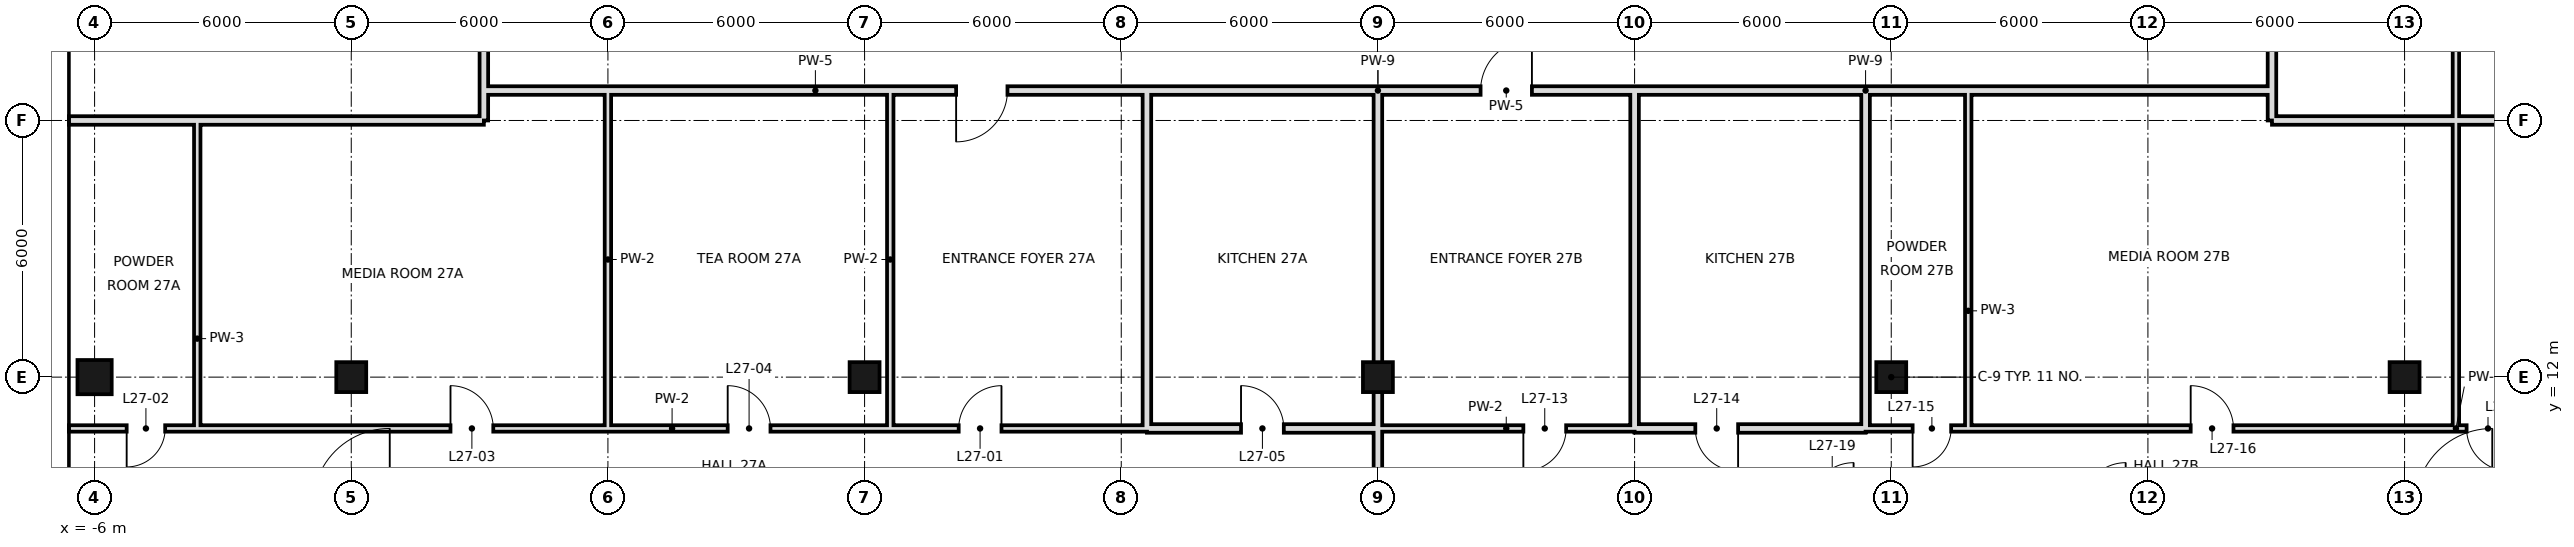
"""IFC4 building model, lengths in metres.
Left out: names, types, materials, properties, quantities, classifications, styles, units other than length and angle.
Written with IfcOpenShell. Run it as: python <this file> out.ifc"""

import sys

from ifc_helpers import new_model, si_unit, direction, frame, frame_2d, origin, origin_2d, place, context, subcontext, project, spatial, rectangle, hollow_rectangle, extrude, element, fill, save


model = new_model("IFC4")
c1 = context("Model", 3, precision=1e-05, world=origin(), true_north=direction((0.0, 1.0)))
c2 = subcontext(c1, "Body", "Model", "MODEL_VIEW")
j1 = project(units=[si_unit("LENGTHUNIT", "METRE"), si_unit("PLANEANGLEUNIT", "RADIAN")], contexts=[c1])
p1 = place(None, origin())
s1 = spatial("IfcSite", under=j1, at=p1, CompositionType="ELEMENT")
p2 = place(p1, origin())
s2 = spatial("IfcBuilding", under=s1, at=p2, CompositionType="ELEMENT")
p3 = place(p2, frame((0.0, 0.0, 123.2)))
s3 = spatial("IfcBuildingStorey", under=s2, at=p3, CompositionType="ELEMENT", Elevation=123.2)
p4 = place(p3, frame((-6.0, 12.0, 0.0), z_axis=(0.0, 0.0, 1.0), x_axis=(1.0, 0.0, 0.0)))
e1 = element("IfcColumn", 1, at=p4, inside=s3, PredefinedType="COLUMN", context=c2, shape_type="SweptSolid", body=[
    extrude(hollow_rectangle(XDim=0.8, YDim=0.8, WallThickness=0.04, at=origin_2d()), origin(), (0.0, 0.0, 1.0), 3.6),
])
for number, where, z_axis, x_axis in (
    (2, (0.0, 12.0, 0.0), (0.0, 0.0, 1.0), (1.0, 0.0, 0.0)),
    (3, (12.0, 12.0, 0.0), (0.0, 0.0, 1.0), (1.0, 0.0, 0.0)),
    (4, (24.0, 12.0, 0.0), (0.0, 0.0, 1.0), (1.0, 0.0, 0.0)),
    (5, (36.0, 12.0, 0.0), (0.0, 0.0, 1.0), (1.0, 0.0, 0.0)),
    (6, (48.0, 12.0, 0.0), (0.0, 0.0, 1.0), (1.0, 0.0, 0.0)),
):
    element("IfcColumn", number, at=place(p3, frame(where, z_axis=z_axis, x_axis=x_axis)), inside=s3, PredefinedType="COLUMN", context=c2, shape_type="SweptSolid", body=[
        extrude(hollow_rectangle(XDim=0.7, YDim=0.7, WallThickness=0.036, at=origin_2d()), origin(), (0.0, 0.0, 1.0), 3.6),
    ])
p5 = place(p3, frame((-3.6, 10.8, 0.0), z_axis=(0.0, 0.0, 1.0), x_axis=(0.0, 1.0, 0.0)))
e7 = element("IfcWall", 7, at=p5, inside=s3, PredefinedType="PARTITIONING", context=c2, shape_type="SweptSolid", body=[
    extrude(rectangle(XDim=7.2, YDim=0.15, at=frame_2d((3.6, 0.0))), origin(), (0.0, 0.0, 1.0), 3.42),
])
p6 = place(p3, frame((12.6, 10.8, 0.0), z_axis=(0.0, 0.0, 1.0), x_axis=(0.0, 1.0, 0.0)))
e8 = element("IfcWall", 8, at=p6, inside=s3, PredefinedType="PARTITIONING", context=c2, shape_type="SweptSolid", body=[
    extrude(rectangle(XDim=7.9, YDim=0.15, at=frame_2d((3.95, 0.0))), origin(), (0.0, 0.0, 1.0), 3.42),
])
for number, where, z_axis, x_axis in (
    (9, (18.6, 10.8, 0.0), (0.0, 0.0, 1.0), (0.0, 1.0, 0.0)),
    (10, (24.0, 10.8, 0.0), (0.0, 0.0, 1.0), (0.0, 1.0, 0.0)),
):
    element("IfcWall", number, at=place(p3, frame(where, z_axis=z_axis, x_axis=x_axis)), inside=s3, PredefinedType="SOLIDWALL", context=c2, shape_type="SweptSolid", body=[
        extrude(rectangle(XDim=7.9, YDim=0.2, at=frame_2d((3.95, 0.0))), origin(), (0.0, 0.0, 1.0), 2.72),
    ])
p7 = place(p3, frame((24.0, 0.0, 0.0), z_axis=(0.0, 0.0, 1.0), x_axis=(0.0, 1.0, 0.0)))
e11 = element("IfcWall", 11, at=p7, inside=s3, PredefinedType="SOLIDWALL", context=c2, shape_type="SweptSolid", body=[
    extrude(rectangle(XDim=10.8, YDim=0.2, at=frame_2d((5.4, 0.0))), origin(), (0.0, 0.0, 1.0), 2.72),
])
p8 = place(p3, frame((3.1, 18.0, 0.0), z_axis=(0.0, 0.0, 1.0), x_axis=(0.0, 1.0, 0.0)))
e12 = element("IfcWall", 12, at=p8, inside=s3, PredefinedType="SOLIDWALL", context=c2, shape_type="SweptSolid", body=[
    extrude(rectangle(XDim=30.6, YDim=0.2, at=frame_2d((15.3, 0.0))), origin(), (0.0, 0.0, 1.0), 2.72),
])
p9 = place(p8, frame((14.75, 0.0, 0.0)))
e13 = element("IfcOpeningElement", 13, at=p9, cuts=e12, PredefinedType="OPENING", context=c2, shape_type="SweptSolid", body=[
    extrude(rectangle(XDim=1.2, YDim=2.4, at=frame_2d((0.6, 1.2))), frame((0.0, 0.11, 0.0), z_axis=(0.0, -1.0, 0.0), x_axis=(1.0, 0.0, 0.0)), (0.0, 0.0, 1.0), 0.22),
])
for number, where, z_axis, x_axis in (
    (14, (30.0, 10.8, 0.0), (0.0, 0.0, 1.0), (0.0, 1.0, 0.0)),
    (15, (35.4, 10.8, 0.0), (0.0, 0.0, 1.0), (0.0, 1.0, 0.0)),
):
    element("IfcWall", number, at=place(p3, frame(where, z_axis=z_axis, x_axis=x_axis)), inside=s3, PredefinedType="SOLIDWALL", context=c2, shape_type="SweptSolid", body=[
        extrude(rectangle(XDim=7.9, YDim=0.2, at=frame_2d((3.95, 0.0))), origin(), (0.0, 0.0, 1.0), 2.72),
    ])
p10 = place(p3, frame((37.8, 10.8, 0.0), z_axis=(0.0, 0.0, 1.0), x_axis=(0.0, 1.0, 0.0)))
e16 = element("IfcWall", 16, at=p10, inside=s3, PredefinedType="PARTITIONING", context=c2, shape_type="SweptSolid", body=[
    extrude(rectangle(XDim=7.9, YDim=0.15, at=frame_2d((3.95, 0.0))), origin(), (0.0, 0.0, 1.0), 3.42),
])
p11 = place(p3, frame((44.9, 18.7, 0.0), z_axis=(0.0, 0.0, 1.0), x_axis=(0.0, 1.0, 0.0)))
e17 = element("IfcWall", 17, at=p11, inside=s3, PredefinedType="SOLIDWALL", context=c2, shape_type="SweptSolid", body=[
    extrude(rectangle(XDim=14.9, YDim=0.2, at=frame_2d((7.45, 0.0))), origin(), (0.0, 0.0, 1.0), 2.97),
])
p12 = place(p11, frame((9.72, 0.0, 0.0)))
e18 = element("IfcOpeningElement", 18, at=p12, cuts=e17, PredefinedType="OPENING", context=c2, shape_type="SweptSolid", body=[
    extrude(rectangle(XDim=1.2, YDim=2.4, at=frame_2d((0.6, 1.2))), frame((0.0, 0.11, 0.0), z_axis=(0.0, -1.0, 0.0), x_axis=(1.0, 0.0, 0.0)), (0.0, 0.0, 1.0), 0.22),
])
p13 = place(p3, frame((44.9, 18.0, 0.0), z_axis=(0.0, 0.0, 1.0), x_axis=(0.0, 1.0, 0.0)))
e19 = element("IfcWall", 19, at=p13, inside=s3, PredefinedType="SOLIDWALL", context=c2, shape_type="SweptSolid", body=[
    extrude(rectangle(XDim=0.7, YDim=0.2, at=frame_2d((0.35, 0.0))), origin(), (0.0, 0.0, 1.0), 2.97),
])
p14 = place(p3, frame((49.2, 10.8, 0.0), z_axis=(0.0, 0.0, 1.0), x_axis=(0.0, 1.0, 0.0)))
e20 = element("IfcWall", 20, at=p14, inside=s3, PredefinedType="PARTITIONING", context=c2, shape_type="SweptSolid", body=[
    extrude(rectangle(XDim=20.4, YDim=0.15, at=frame_2d((10.2, 0.0))), origin(), (0.0, 0.0, 1.0), 3.42),
])
p15 = place(p14, frame((17.68, 0.0, 0.0)))
e21 = element("IfcOpeningElement", 21, at=p15, cuts=e20, PredefinedType="OPENING", context=c2, shape_type="SweptSolid", body=[
    extrude(rectangle(XDim=1.0, YDim=2.4, at=frame_2d((0.5, 1.2))), frame((0.0, 0.085, 0.0), z_axis=(0.0, -1.0, 0.0), x_axis=(1.0, 0.0, 0.0)), (0.0, 0.0, 1.0), 0.17),
])
p16 = place(p14, frame((9.88, 0.0, 0.0)))
e22 = element("IfcOpeningElement", 22, at=p16, cuts=e20, PredefinedType="OPENING", context=c2, shape_type="SweptSolid", body=[
    extrude(rectangle(XDim=1.0, YDim=2.4, at=frame_2d((0.5, 1.2))), frame((0.0, 0.085, 0.0), z_axis=(0.0, -1.0, 0.0), x_axis=(1.0, 0.0, 0.0)), (0.0, 0.0, 1.0), 0.17),
])
p17 = place(p3, frame((6.0, 10.8, 0.0), z_axis=(0.0, 0.0, 1.0), x_axis=(0.0, 1.0, 0.0)))
e23 = element("IfcWall", 23, at=p17, inside=s3, PredefinedType="PARTITIONING", context=c2, shape_type="SweptSolid", body=[
    extrude(rectangle(XDim=7.9, YDim=0.15, at=frame_2d((3.95, 0.0))), origin(), (0.0, 0.0, 1.0), 2.72),
])
p18 = place(p3, frame((18.6, 10.8, 0.0), z_axis=(0.0, 0.0, 1.0), x_axis=(1.0, 0.0, 0.0)))
e24 = element("IfcWall", 24, at=p18, inside=s3, PredefinedType="SOLIDWALL", context=c2, shape_type="SweptSolid", body=[
    extrude(rectangle(XDim=5.4, YDim=0.2, at=frame_2d((2.7, 0.0))), origin(), (0.0, 0.0, 1.0), 2.72),
])
p19 = place(p18, frame((2.2, 0.0, 0.0)))
e25 = element("IfcOpeningElement", 25, at=p19, cuts=e24, PredefinedType="OPENING", context=c2, shape_type="SweptSolid", body=[
    extrude(rectangle(XDim=1.0, YDim=2.4, at=frame_2d((0.5, 1.2))), frame((0.0, 0.11, 0.0), z_axis=(0.0, -1.0, 0.0), x_axis=(1.0, 0.0, 0.0)), (0.0, 0.0, 1.0), 0.22),
])
p20 = place(p3, frame((30.0, 10.8, 0.0), z_axis=(0.0, 0.0, 1.0), x_axis=(1.0, 0.0, 0.0)))
e26 = element("IfcWall", 26, at=p20, inside=s3, PredefinedType="SOLIDWALL", context=c2, shape_type="SweptSolid", body=[
    extrude(rectangle(XDim=5.4, YDim=0.2, at=frame_2d((2.7, 0.0))), origin(), (0.0, 0.0, 1.0), 2.72),
])
p21 = place(p20, frame((1.42, 0.0, 0.0)))
e27 = element("IfcOpeningElement", 27, at=p21, cuts=e26, PredefinedType="OPENING", context=c2, shape_type="SweptSolid", body=[
    extrude(rectangle(XDim=1.0, YDim=2.4, at=frame_2d((0.5, 1.2))), frame((0.0, 0.11, 0.0), z_axis=(0.0, -1.0, 0.0), x_axis=(1.0, 0.0, 0.0)), (0.0, 0.0, 1.0), 0.22),
])
p22 = place(p3, frame((-3.6, 10.8, 0.0), z_axis=(0.0, 0.0, 1.0), x_axis=(1.0, 0.0, 0.0)))
e28 = element("IfcWall", 28, at=p22, inside=s3, PredefinedType="PARTITIONING", context=c2, shape_type="SweptSolid", body=[
    extrude(rectangle(XDim=22.2, YDim=0.15, at=frame_2d((11.1, 0.0))), origin(), (0.0, 0.0, 1.0), 3.42),
])
p23 = place(p22, frame((17.8, 0.0, 0.0)))
e29 = element("IfcOpeningElement", 29, at=p23, cuts=e28, PredefinedType="OPENING", context=c2, shape_type="SweptSolid", body=[
    extrude(rectangle(XDim=1.0, YDim=2.4, at=frame_2d((0.5, 1.2))), frame((0.0, 0.085, 0.0), z_axis=(0.0, -1.0, 0.0), x_axis=(1.0, 0.0, 0.0)), (0.0, 0.0, 1.0), 0.17),
])
p24 = place(p22, frame((5.92, 0.0, 0.0)))
e30 = element("IfcOpeningElement", 30, at=p24, cuts=e28, PredefinedType="OPENING", context=c2, shape_type="SweptSolid", body=[
    extrude(rectangle(XDim=1.0, YDim=2.4, at=frame_2d((0.5, 1.2))), frame((0.0, 0.085, 0.0), z_axis=(0.0, -1.0, 0.0), x_axis=(1.0, 0.0, 0.0)), (0.0, 0.0, 1.0), 0.17),
])
p25 = place(p22, frame((12.4, 0.0, 0.0)))
e31 = element("IfcOpeningElement", 31, at=p25, cuts=e28, PredefinedType="OPENING", context=c2, shape_type="SweptSolid", body=[
    extrude(rectangle(XDim=1.0, YDim=2.4, at=frame_2d((0.5, 1.2))), frame((0.0, 0.085, 0.0), z_axis=(0.0, -1.0, 0.0), x_axis=(1.0, 0.0, 0.0)), (0.0, 0.0, 1.0), 0.17),
])
p26 = place(p3, frame((24.0, 10.8, 0.0), z_axis=(0.0, 0.0, 1.0), x_axis=(1.0, 0.0, 0.0)))
e32 = element("IfcWall", 32, at=p26, inside=s3, PredefinedType="PARTITIONING", context=c2, shape_type="SweptSolid", body=[
    extrude(rectangle(XDim=6.0, YDim=0.15, at=frame_2d((3.0, 0.0))), origin(), (0.0, 0.0, 1.0), 3.42),
])
p27 = place(p26, frame((3.4, 0.0, 0.0)))
e33 = element("IfcOpeningElement", 33, at=p27, cuts=e32, PredefinedType="OPENING", context=c2, shape_type="SweptSolid", body=[
    extrude(rectangle(XDim=1.0, YDim=2.4, at=frame_2d((0.5, 1.2))), frame((0.0, 0.085, 0.0), z_axis=(0.0, -1.0, 0.0), x_axis=(1.0, 0.0, 0.0)), (0.0, 0.0, 1.0), 0.17),
])
p28 = place(p3, frame((37.8, 10.8, 0.0), z_axis=(0.0, 0.0, 1.0), x_axis=(1.0, 0.0, 0.0)))
e34 = element("IfcWall", 34, at=p28, inside=s3, PredefinedType="PARTITIONING", context=c2, shape_type="SweptSolid", body=[
    extrude(rectangle(XDim=22.8, YDim=0.15, at=frame_2d((11.4, 0.0))), origin(), (0.0, 0.0, 1.0), 3.42),
])
p29 = place(p28, frame((5.2, 0.0, 0.0)))
e35 = element("IfcOpeningElement", 35, at=p29, cuts=e34, PredefinedType="OPENING", context=c2, shape_type="SweptSolid", body=[
    extrude(rectangle(XDim=1.0, YDim=2.4, at=frame_2d((0.5, 1.2))), frame((0.0, 0.085, 0.0), z_axis=(0.0, -1.0, 0.0), x_axis=(1.0, 0.0, 0.0)), (0.0, 0.0, 1.0), 0.17),
])
p30 = place(p28, frame((11.65, 0.0, 0.0)))
e36 = element("IfcOpeningElement", 36, at=p30, cuts=e34, PredefinedType="OPENING", context=c2, shape_type="SweptSolid", body=[
    extrude(rectangle(XDim=1.0, YDim=2.4, at=frame_2d((0.5, 1.2))), frame((0.0, 0.085, 0.0), z_axis=(0.0, -1.0, 0.0), x_axis=(1.0, 0.0, 0.0)), (0.0, 0.0, 1.0), 0.17),
])
p31 = place(p3, frame((-6.6, 10.8, 0.0), z_axis=(0.0, 0.0, 1.0), x_axis=(1.0, 0.0, 0.0)))
e37 = element("IfcWall", 37, at=p31, inside=s3, PredefinedType="PARTITIONING", context=c2, shape_type="SweptSolid", body=[
    extrude(rectangle(XDim=3.0, YDim=0.15, at=frame_2d((1.5, 0.0))), origin(), (0.0, 0.0, 1.0), 3.42),
])
p32 = place(p31, frame((1.35, 0.0, 0.0)))
e38 = element("IfcOpeningElement", 38, at=p32, cuts=e37, PredefinedType="OPENING", context=c2, shape_type="SweptSolid", body=[
    extrude(rectangle(XDim=0.9, YDim=2.4, at=frame_2d((0.45, 1.2))), frame((0.0, 0.085, 0.0), z_axis=(0.0, -1.0, 0.0), x_axis=(1.0, 0.0, 0.0)), (0.0, 0.0, 1.0), 0.17),
])
p33 = place(p3, frame((35.4, 10.8, 0.0), z_axis=(0.0, 0.0, 1.0), x_axis=(1.0, 0.0, 0.0)))
e39 = element("IfcWall", 39, at=p33, inside=s3, PredefinedType="PARTITIONING", context=c2, shape_type="SweptSolid", body=[
    extrude(rectangle(XDim=2.4, YDim=0.15, at=frame_2d((1.2, 0.0))), origin(), (0.0, 0.0, 1.0), 3.42),
])
p34 = place(p33, frame((1.1, 0.0, 0.0)))
e40 = element("IfcOpeningElement", 40, at=p34, cuts=e39, PredefinedType="OPENING", context=c2, shape_type="SweptSolid", body=[
    extrude(rectangle(XDim=0.9, YDim=2.4, at=frame_2d((0.45, 1.2))), frame((0.0, 0.085, 0.0), z_axis=(0.0, -1.0, 0.0), x_axis=(1.0, 0.0, 0.0)), (0.0, 0.0, 1.0), 0.17),
])
p35 = place(p3, frame((-6.6, 18.0, 0.0), z_axis=(0.0, 0.0, 1.0), x_axis=(1.0, 0.0, 0.0)))
e41 = element("IfcWall", 41, at=p35, inside=s3, PredefinedType="SOLIDWALL", context=c2, shape_type="SweptSolid", body=[
    extrude(rectangle(XDim=9.7, YDim=0.2, at=frame_2d((4.85, 0.0))), origin(), (0.0, 0.0, 1.0), 2.72),
])
p36 = place(p3, frame((44.9, 18.0, 0.0), z_axis=(0.0, 0.0, 1.0), x_axis=(1.0, 0.0, 0.0)))
e42 = element("IfcWall", 42, at=p36, inside=s3, PredefinedType="SOLIDWALL", context=c2, shape_type="SweptSolid", body=[
    extrude(rectangle(XDim=15.7, YDim=0.2, at=frame_2d((7.85, 0.0))), origin(), (0.0, 0.0, 1.0), 2.72),
])
p37 = place(p3, frame((3.1, 18.7, 0.0), z_axis=(0.0, 0.0, 1.0), x_axis=(1.0, 0.0, 0.0)))
e43 = element("IfcWall", 43, at=p37, inside=s3, PredefinedType="SOLIDWALL", context=c2, shape_type="SweptSolid", body=[
    extrude(rectangle(XDim=15.5, YDim=0.2, at=frame_2d((7.75, 0.0))), origin(), (0.0, 0.0, 1.0), 2.72),
])
p38 = place(p37, frame((11.04, 0.0, 0.0)))
e44 = element("IfcOpeningElement", 44, at=p38, cuts=e43, PredefinedType="OPENING", context=c2, shape_type="SweptSolid", body=[
    extrude(rectangle(XDim=1.2, YDim=2.4, at=frame_2d((0.6, 1.2))), frame((0.0, 0.11, 0.0), z_axis=(0.0, -1.0, 0.0), x_axis=(1.0, 0.0, 0.0)), (0.0, 0.0, 1.0), 0.22),
])
p39 = place(p3, frame((24.0, 18.7, 0.0), z_axis=(0.0, 0.0, 1.0), x_axis=(1.0, 0.0, 0.0)))
e45 = element("IfcWall", 45, at=p39, inside=s3, PredefinedType="SOLIDWALL", context=c2, shape_type="SweptSolid", body=[
    extrude(rectangle(XDim=6.0, YDim=0.2, at=frame_2d((3.0, 0.0))), origin(), (0.0, 0.0, 1.0), 2.72),
])
p40 = place(p39, frame((2.4, 0.0, 0.0)))
e46 = element("IfcOpeningElement", 46, at=p40, cuts=e45, PredefinedType="OPENING", context=c2, shape_type="SweptSolid", body=[
    extrude(rectangle(XDim=1.2, YDim=2.4, at=frame_2d((0.6, 1.2))), frame((0.0, 0.11, 0.0), z_axis=(0.0, -1.0, 0.0), x_axis=(1.0, 0.0, 0.0)), (0.0, 0.0, 1.0), 0.22),
])
p41 = place(p3, frame((35.4, 18.7, 0.0), z_axis=(0.0, 0.0, 1.0), x_axis=(1.0, 0.0, 0.0)))
e47 = element("IfcWall", 47, at=p41, inside=s3, PredefinedType="SOLIDWALL", context=c2, shape_type="SweptSolid", body=[
    extrude(rectangle(XDim=9.5, YDim=0.2, at=frame_2d((4.75, 0.0))), origin(), (0.0, 0.0, 1.0), 2.72),
])
p42 = place(p3, frame((18.6, 18.7, 0.0), z_axis=(0.0, 0.0, 1.0), x_axis=(1.0, 0.0, 0.0)))
e48 = element("IfcWall", 48, at=p42, inside=s3, PredefinedType="SOLIDWALL", context=c2, shape_type="SweptSolid", body=[
    extrude(rectangle(XDim=5.4, YDim=0.2, at=frame_2d((2.7, 0.0))), origin(), (0.0, 0.0, 1.0), 3.42),
])
p43 = place(p3, frame((30.0, 18.7, 0.0), z_axis=(0.0, 0.0, 1.0), x_axis=(1.0, 0.0, 0.0)))
e49 = element("IfcWall", 49, at=p43, inside=s3, PredefinedType="SOLIDWALL", context=c2, shape_type="SweptSolid", body=[
    extrude(rectangle(XDim=5.4, YDim=0.2, at=frame_2d((2.7, 0.0))), origin(), (0.0, 0.0, 1.0), 2.72),
])
p44 = place(p23, frame((1.0, 0.0, 0.0), z_axis=(0.0, 0.0, 1.0), x_axis=(-1.0, 0.0, 0.0)))
e50 = element("IfcDoor", 50, at=p44, inside=s3, OperationType="SINGLE_SWING_LEFT", PredefinedType="DOOR", context=c2, shape_type="SweptSolid", body=[
    extrude(rectangle(XDim=1.0, YDim=2.4, at=frame_2d((0.5, 1.2))), frame((0.0, 0.025, 0.0), z_axis=(0.0, -1.0, 0.0), x_axis=(1.0, 0.0, 0.0)), (0.0, 0.0, 1.0), 0.05),
])
fill(e29, e50)
p45 = place(p32, frame((0.9, 0.0, 0.0), z_axis=(0.0, 0.0, 1.0), x_axis=(-1.0, 0.0, 0.0)))
e51 = element("IfcDoor", 51, at=p45, inside=s3, OperationType="SINGLE_SWING_RIGHT", PredefinedType="DOOR", context=c2, shape_type="SweptSolid", body=[
    extrude(rectangle(XDim=0.9, YDim=2.4, at=frame_2d((0.45, 1.2))), frame((0.0, 0.025, 0.0), z_axis=(0.0, -1.0, 0.0), x_axis=(1.0, 0.0, 0.0)), (0.0, 0.0, 1.0), 0.05),
])
fill(e38, e51)
p46 = place(p24, origin())
e52 = element("IfcDoor", 52, at=p46, inside=s3, OperationType="SINGLE_SWING_LEFT", PredefinedType="DOOR", context=c2, shape_type="SweptSolid", body=[
    extrude(rectangle(XDim=1.0, YDim=2.4, at=frame_2d((0.5, 1.2))), frame((0.0, 0.025, 0.0), z_axis=(0.0, -1.0, 0.0), x_axis=(1.0, 0.0, 0.0)), (0.0, 0.0, 1.0), 0.05),
])
fill(e30, e52)
p47 = place(p25, origin())
e53 = element("IfcDoor", 53, at=p47, inside=s3, OperationType="SINGLE_SWING_LEFT", PredefinedType="DOOR", context=c2, shape_type="SweptSolid", body=[
    extrude(rectangle(XDim=1.0, YDim=2.4, at=frame_2d((0.5, 1.2))), frame((0.0, 0.025, 0.0), z_axis=(0.0, -1.0, 0.0), x_axis=(1.0, 0.0, 0.0)), (0.0, 0.0, 1.0), 0.05),
])
fill(e31, e53)
p48 = place(p19, origin())
e54 = element("IfcDoor", 54, at=p48, inside=s3, OperationType="SINGLE_SWING_LEFT", PredefinedType="DOOR", context=c2, shape_type="SweptSolid", body=[
    extrude(rectangle(XDim=1.0, YDim=2.4, at=frame_2d((0.5, 1.2))), frame((0.0, 0.025, 0.0), z_axis=(0.0, -1.0, 0.0), x_axis=(1.0, 0.0, 0.0)), (0.0, 0.0, 1.0), 0.05),
])
fill(e25, e54)
p49 = place(p27, frame((1.0, 0.0, 0.0), z_axis=(0.0, 0.0, 1.0), x_axis=(-1.0, 0.0, 0.0)))
e55 = element("IfcDoor", 55, at=p49, inside=s3, OperationType="SINGLE_SWING_RIGHT", PredefinedType="DOOR", context=c2, shape_type="SweptSolid", body=[
    extrude(rectangle(XDim=1.0, YDim=2.4, at=frame_2d((0.5, 1.2))), frame((0.0, 0.025, 0.0), z_axis=(0.0, -1.0, 0.0), x_axis=(1.0, 0.0, 0.0)), (0.0, 0.0, 1.0), 0.05),
])
fill(e33, e55)
p50 = place(p21, origin())
e56 = element("IfcDoor", 56, at=p50, inside=s3, OperationType="SINGLE_SWING_RIGHT", PredefinedType="DOOR", context=c2, shape_type="SweptSolid", body=[
    extrude(rectangle(XDim=1.0, YDim=2.4, at=frame_2d((0.5, 1.2))), frame((0.0, 0.025, 0.0), z_axis=(0.0, -1.0, 0.0), x_axis=(1.0, 0.0, 0.0)), (0.0, 0.0, 1.0), 0.05),
])
fill(e27, e56)
p51 = place(p34, frame((0.9, 0.0, 0.0), z_axis=(0.0, 0.0, 1.0), x_axis=(-1.0, 0.0, 0.0)))
e57 = element("IfcDoor", 57, at=p51, inside=s3, OperationType="SINGLE_SWING_RIGHT", PredefinedType="DOOR", context=c2, shape_type="SweptSolid", body=[
    extrude(rectangle(XDim=0.9, YDim=2.4, at=frame_2d((0.45, 1.2))), frame((0.0, 0.025, 0.0), z_axis=(0.0, -1.0, 0.0), x_axis=(1.0, 0.0, 0.0)), (0.0, 0.0, 1.0), 0.05),
])
fill(e40, e57)
p52 = place(p29, origin())
e58 = element("IfcDoor", 58, at=p52, inside=s3, OperationType="SINGLE_SWING_LEFT", PredefinedType="DOOR", context=c2, shape_type="SweptSolid", body=[
    extrude(rectangle(XDim=1.0, YDim=2.4, at=frame_2d((0.5, 1.2))), frame((0.0, 0.025, 0.0), z_axis=(0.0, -1.0, 0.0), x_axis=(1.0, 0.0, 0.0)), (0.0, 0.0, 1.0), 0.05),
])
fill(e35, e58)
p53 = place(p30, origin())
e59 = element("IfcDoor", 59, at=p53, inside=s3, OperationType="SINGLE_SWING_RIGHT", PredefinedType="DOOR", context=c2, shape_type="SweptSolid", body=[
    extrude(rectangle(XDim=1.0, YDim=2.4, at=frame_2d((0.5, 1.2))), frame((0.0, 0.025, 0.0), z_axis=(0.0, -1.0, 0.0), x_axis=(1.0, 0.0, 0.0)), (0.0, 0.0, 1.0), 0.05),
])
fill(e36, e59)
p54 = place(p38, frame((1.2, 0.0, 0.0), z_axis=(0.0, 0.0, 1.0), x_axis=(-1.0, 0.0, 0.0)))
e60 = element("IfcDoor", 60, at=p54, inside=s3, OperationType="SINGLE_SWING_RIGHT", PredefinedType="DOOR", context=c2, shape_type="SweptSolid", body=[
    extrude(rectangle(XDim=1.2, YDim=2.4, at=frame_2d((0.6, 1.2))), frame((0.0, 0.025, 0.0), z_axis=(0.0, -1.0, 0.0), x_axis=(1.0, 0.0, 0.0)), (0.0, 0.0, 1.0), 0.05),
])
fill(e44, e60)
p55 = place(p40, frame((1.2, 0.0, 0.0), z_axis=(0.0, 0.0, 1.0), x_axis=(-1.0, 0.0, 0.0)))
e61 = element("IfcDoor", 61, at=p55, inside=s3, OperationType="SINGLE_SWING_LEFT", PredefinedType="DOOR", context=c2, shape_type="SweptSolid", body=[
    extrude(rectangle(XDim=1.2, YDim=2.4, at=frame_2d((0.6, 1.2))), frame((0.0, 0.025, 0.0), z_axis=(0.0, -1.0, 0.0), x_axis=(1.0, 0.0, 0.0)), (0.0, 0.0, 1.0), 0.05),
])
fill(e46, e61)
save(model, sys.argv[1])
